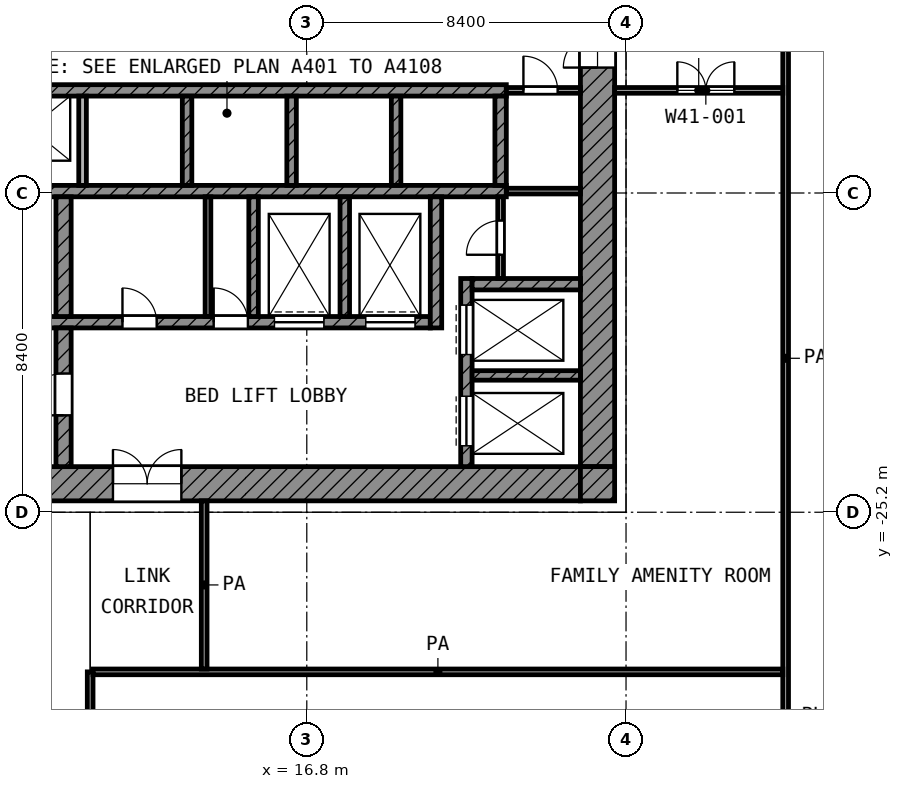
"""IFC4 building model, lengths in metres.
Left out: names, types, materials, properties, quantities, classifications, styles, units other than length and angle.
Written with IfcOpenShell. Run it as: python <this file> out.ifc"""

import sys

from ifc_helpers import new_model, si_unit, direction, frame, frame_2d, origin, place, context, subcontext, project, spatial, rectangle, extrude, element, fill, save


model = new_model("IFC4")
c1 = context("Model", 3, precision=1e-05, world=origin(), true_north=direction((0.0, 1.0)))
c2 = subcontext(c1, "Body", "Model", "MODEL_VIEW")
j1 = project(units=[si_unit("LENGTHUNIT", "METRE"), si_unit("PLANEANGLEUNIT", "RADIAN")], contexts=[c1])
p1 = place(None, origin())
s1 = spatial("IfcSite", under=j1, at=p1, CompositionType="ELEMENT")
p2 = place(p1, origin())
s2 = spatial("IfcBuilding", under=s1, at=p2, CompositionType="ELEMENT")
p3 = place(p2, frame((0.0, 0.0, 200.4)))
s3 = spatial("IfcBuildingStorey", under=s2, at=p3, CompositionType="ELEMENT", Elevation=200.4)
p4 = place(p3, frame((24.45, -24.0, 0.0), z_axis=(0.0, 0.0, 1.0), x_axis=(0.0, 1.0, 0.0)))
e1 = element("IfcWall", 1, at=p4, inside=s3, PredefinedType="SHEAR", context=c2, shape_type="SweptSolid", body=[
    extrude(rectangle(XDim=18.6, YDim=0.9, at=frame_2d((9.3, 0.0))), origin(), (0.0, 0.0, 1.0), 3.6),
])
p5 = place(p4, frame((10.5, 0.0, 0.0)))
e2 = element("IfcOpeningElement", 2, at=p5, cuts=e1, PredefinedType="OPENING", context=c2, shape_type="SweptSolid", body=[
    extrude(rectangle(XDim=1.8, YDim=2.1, at=frame_2d((0.9, 1.05))), frame((0.0, 0.46, 0.0), z_axis=(0.0, -1.0, 0.0), x_axis=(1.0, 0.0, 0.0)), (0.0, 0.0, 1.0), 0.92),
])
p6 = place(p3, frame((5.4, -24.45, 0.0), z_axis=(0.0, 0.0, 1.0), x_axis=(1.0, 0.0, 0.0)))
e3 = element("IfcWall", 3, at=p6, inside=s3, PredefinedType="SHEAR", context=c2, shape_type="SweptSolid", body=[
    extrude(rectangle(XDim=18.6, YDim=0.9, at=frame_2d((9.3, 0.0))), origin(), (0.0, 0.0, 1.0), 3.6),
])
p7 = place(p6, frame((6.3, 0.0, 0.0)))
e4 = element("IfcOpeningElement", 4, at=p7, cuts=e3, PredefinedType="OPENING", context=c2, shape_type="SweptSolid", body=[
    extrude(rectangle(XDim=1.8, YDim=2.1, at=frame_2d((0.9, 1.05))), frame((0.0, 0.46, 0.0), z_axis=(0.0, -1.0, 0.0), x_axis=(1.0, 0.0, 0.0)), (0.0, 0.0, 1.0), 0.92),
])
p8 = place(p3, frame((24.45, -24.9, 0.0), z_axis=(0.0, 0.0, 1.0), x_axis=(0.0, 1.0, 0.0)))
e5 = element("IfcWall", 5, at=p8, inside=s3, PredefinedType="SHEAR", context=c2, shape_type="SweptSolid", body=[
    extrude(rectangle(XDim=0.9, YDim=0.9, at=frame_2d((0.45, 0.0))), origin(), (0.0, 0.0, 1.0), 3.6),
])
p9 = place(p3, frame((5.4, -14.1, 0.0), z_axis=(0.0, 0.0, 1.0), x_axis=(1.0, 0.0, 0.0)))
e6 = element("IfcWall", 6, at=p9, inside=s3, PredefinedType="SHEAR", context=c2, shape_type="SweptSolid", body=[
    extrude(rectangle(XDim=16.65, YDim=0.3, at=frame_2d((8.325, 0.0))), origin(), (0.0, 0.0, 1.0), 3.6),
])
p10 = place(p9, frame((0.825, 0.0, 0.0)))
e7 = element("IfcOpeningElement", 7, at=p10, cuts=e6, PredefinedType="OPENING", context=c2, shape_type="SweptSolid", body=[
    extrude(rectangle(XDim=1.1, YDim=2.1, at=frame_2d((0.55, 1.05))), frame((0.0, 0.16, 0.0), z_axis=(0.0, -1.0, 0.0), x_axis=(1.0, 0.0, 0.0)), (0.0, 0.0, 1.0), 0.32),
])
p11 = place(p9, frame((3.575, 0.0, 0.0)))
e8 = element("IfcOpeningElement", 8, at=p11, cuts=e6, PredefinedType="OPENING", context=c2, shape_type="SweptSolid", body=[
    extrude(rectangle(XDim=1.1, YDim=2.1, at=frame_2d((0.55, 1.05))), frame((0.0, 0.16, 0.0), z_axis=(0.0, -1.0, 0.0), x_axis=(1.0, 0.0, 0.0)), (0.0, 0.0, 1.0), 0.32),
])
p12 = place(p3, frame((5.4, -16.75, 0.0), z_axis=(0.0, 0.0, 1.0), x_axis=(1.0, 0.0, 0.0)))
e9 = element("IfcWall", 9, at=p12, inside=s3, PredefinedType="SHEAR", context=c2, shape_type="SweptSolid", body=[
    extrude(rectangle(XDim=16.65, YDim=0.3, at=frame_2d((8.325, 0.0))), origin(), (0.0, 0.0, 1.0), 3.6),
])
p13 = place(p3, frame((5.4, -20.2, 0.0), z_axis=(0.0, 0.0, 1.0), x_axis=(1.0, 0.0, 0.0)))
e10 = element("IfcWall", 10, at=p13, inside=s3, PredefinedType="SHEAR", context=c2, shape_type="SweptSolid", body=[
    extrude(rectangle(XDim=14.65, YDim=0.3, at=frame_2d((7.325, 0.0))), origin(), (0.0, 0.0, 1.0), 3.6),
])
p14 = place(p13, frame((10.55, 0.0, 0.0)))
e11 = element("IfcOpeningElement", 11, at=p14, cuts=e10, PredefinedType="OPENING", context=c2, shape_type="SweptSolid", body=[
    extrude(rectangle(XDim=1.3, YDim=2.1, at=frame_2d((0.65, 1.05))), frame((0.0, 0.16, 0.0), z_axis=(0.0, -1.0, 0.0), x_axis=(1.0, 0.0, 0.0)), (0.0, 0.0, 1.0), 0.32),
])
p15 = place(p13, frame((12.95, 0.0, 0.0)))
e12 = element("IfcOpeningElement", 12, at=p15, cuts=e10, PredefinedType="OPENING", context=c2, shape_type="SweptSolid", body=[
    extrude(rectangle(XDim=1.3, YDim=2.1, at=frame_2d((0.65, 1.05))), frame((0.0, 0.16, 0.0), z_axis=(0.0, -1.0, 0.0), x_axis=(1.0, 0.0, 0.0)), (0.0, 0.0, 1.0), 0.32),
])
p16 = place(p13, frame((0.55, 0.0, 0.0)))
e13 = element("IfcOpeningElement", 13, at=p16, cuts=e10, PredefinedType="OPENING", context=c2, shape_type="SweptSolid", body=[
    extrude(rectangle(XDim=1.3, YDim=2.1, at=frame_2d((0.65, 1.05))), frame((0.0, 0.16, 0.0), z_axis=(0.0, -1.0, 0.0), x_axis=(1.0, 0.0, 0.0)), (0.0, 0.0, 1.0), 0.32),
])
p17 = place(p13, frame((2.95, 0.0, 0.0)))
e14 = element("IfcOpeningElement", 14, at=p17, cuts=e10, PredefinedType="OPENING", context=c2, shape_type="SweptSolid", body=[
    extrude(rectangle(XDim=1.3, YDim=2.1, at=frame_2d((0.65, 1.05))), frame((0.0, 0.16, 0.0), z_axis=(0.0, -1.0, 0.0), x_axis=(1.0, 0.0, 0.0)), (0.0, 0.0, 1.0), 0.32),
])
p18 = place(p13, frame((6.55, 0.0, 0.0)))
e15 = element("IfcOpeningElement", 15, at=p18, cuts=e10, PredefinedType="OPENING", context=c2, shape_type="SweptSolid", body=[
    extrude(rectangle(XDim=0.9, YDim=2.1, at=frame_2d((0.45, 1.05))), frame((0.0, 0.16, 0.0), z_axis=(0.0, -1.0, 0.0), x_axis=(1.0, 0.0, 0.0)), (0.0, 0.0, 1.0), 0.32),
])
p19 = place(p13, frame((8.95, 0.0, 0.0)))
e16 = element("IfcOpeningElement", 16, at=p19, cuts=e10, PredefinedType="OPENING", context=c2, shape_type="SweptSolid", body=[
    extrude(rectangle(XDim=0.9, YDim=2.1, at=frame_2d((0.45, 1.05))), frame((0.0, 0.16, 0.0), z_axis=(0.0, -1.0, 0.0), x_axis=(1.0, 0.0, 0.0)), (0.0, 0.0, 1.0), 0.32),
])
p20 = place(p3, frame((10.4, -24.0, 0.0), z_axis=(0.0, 0.0, 1.0), x_axis=(0.0, 1.0, 0.0)))
e17 = element("IfcWall", 17, at=p20, inside=s3, PredefinedType="SHEAR", context=c2, shape_type="SweptSolid", body=[
    extrude(rectangle(XDim=3.65, YDim=0.4, at=frame_2d((1.825, 0.0))), origin(), (0.0, 0.0, 1.0), 3.6),
])
p21 = place(p20, frame((1.35, 0.0, 0.0)))
e18 = element("IfcOpeningElement", 18, at=p21, cuts=e17, PredefinedType="OPENING", context=c2, shape_type="SweptSolid", body=[
    extrude(rectangle(XDim=1.1, YDim=2.1, at=frame_2d((0.55, 1.05))), frame((0.0, 0.21, 0.0), z_axis=(0.0, -1.0, 0.0), x_axis=(1.0, 0.0, 0.0)), (0.0, 0.0, 1.0), 0.42),
])
p22 = place(p3, frame((10.4, -20.05, 0.0), z_axis=(0.0, 0.0, 1.0), x_axis=(0.0, 1.0, 0.0)))
e19 = element("IfcWall", 19, at=p22, inside=s3, PredefinedType="SHEAR", context=c2, shape_type="SweptSolid", body=[
    extrude(rectangle(XDim=3.15, YDim=0.4, at=frame_2d((1.575, 0.0))), origin(), (0.0, 0.0, 1.0), 3.6),
])
p23 = place(p3, frame((20.2, -20.35, 0.0), z_axis=(0.0, 0.0, 1.0), x_axis=(0.0, 1.0, 0.0)))
e20 = element("IfcWall", 20, at=p23, inside=s3, PredefinedType="SHEAR", context=c2, shape_type="SweptSolid", body=[
    extrude(rectangle(XDim=3.45, YDim=0.3, at=frame_2d((1.725, 0.0))), origin(), (0.0, 0.0, 1.0), 3.6),
])
p24 = place(p3, frame((21.9, -16.6, 0.0), z_axis=(0.0, 0.0, 1.0), x_axis=(0.0, 1.0, 0.0)))
e21 = element("IfcWall", 21, at=p24, inside=s3, PredefinedType="SHEAR", context=c2, shape_type="SweptSolid", body=[
    extrude(rectangle(XDim=2.35, YDim=0.3, at=frame_2d((1.175, 0.0))), origin(), (0.0, 0.0, 1.0), 3.6),
])
p25 = place(p3, frame((21.15, -19.2, 0.0), z_axis=(0.0, 0.0, 1.0), x_axis=(1.0, 0.0, 0.0)))
e22 = element("IfcWall", 22, at=p25, inside=s3, PredefinedType="SHEAR", context=c2, shape_type="SweptSolid", body=[
    extrude(rectangle(XDim=2.85, YDim=0.3, at=frame_2d((1.425, 0.0))), origin(), (0.0, 0.0, 1.0), 3.6),
])
p26 = place(p3, frame((21.0, -24.0, 0.0), z_axis=(0.0, 0.0, 1.0), x_axis=(0.0, 1.0, 0.0)))
e23 = element("IfcWall", 23, at=p26, inside=s3, PredefinedType="SHEAR", context=c2, shape_type="SweptSolid", body=[
    extrude(rectangle(XDim=4.95, YDim=0.3, at=frame_2d((2.475, 0.0))), origin(), (0.0, 0.0, 1.0), 3.6),
])
p27 = place(p26, frame((2.95, 0.0, 0.0)))
e24 = element("IfcOpeningElement", 24, at=p27, cuts=e23, PredefinedType="OPENING", context=c2, shape_type="SweptSolid", body=[
    extrude(rectangle(XDim=1.3, YDim=2.1, at=frame_2d((0.65, 1.05))), frame((0.0, 0.16, 0.0), z_axis=(0.0, -1.0, 0.0), x_axis=(1.0, 0.0, 0.0)), (0.0, 0.0, 1.0), 0.32),
])
p28 = place(p26, frame((0.55, 0.0, 0.0)))
e25 = element("IfcOpeningElement", 25, at=p28, cuts=e23, PredefinedType="OPENING", context=c2, shape_type="SweptSolid", body=[
    extrude(rectangle(XDim=1.3, YDim=2.1, at=frame_2d((0.65, 1.05))), frame((0.0, 0.16, 0.0), z_axis=(0.0, -1.0, 0.0), x_axis=(1.0, 0.0, 0.0)), (0.0, 0.0, 1.0), 0.32),
])
p29 = place(p3, frame((21.15, -21.6, 0.0), z_axis=(0.0, 0.0, 1.0), x_axis=(1.0, 0.0, 0.0)))
e26 = element("IfcWall", 26, at=p29, inside=s3, PredefinedType="SHEAR", context=c2, shape_type="SweptSolid", body=[
    extrude(rectangle(XDim=2.85, YDim=0.25, at=frame_2d((1.425, 0.0))), origin(), (0.0, 0.0, 1.0), 3.6),
])
for number, where, z_axis, x_axis in (
    (27, (15.4, -20.05, 0.0), (0.0, 0.0, 1.0), (0.0, 1.0, 0.0)),
    (28, (17.8, -20.05, 0.0), (0.0, 0.0, 1.0), (0.0, 1.0, 0.0)),
):
    element("IfcWall", number, at=place(p3, frame(where, z_axis=z_axis, x_axis=x_axis)), inside=s3, PredefinedType="SHEAR", context=c2, shape_type="SweptSolid", body=[
        extrude(rectangle(XDim=3.15, YDim=0.25, at=frame_2d((1.575, 0.0))), origin(), (0.0, 0.0, 1.0), 3.6),
    ])
p30 = place(p3, frame((10.9, -16.6, 0.0), z_axis=(0.0, 0.0, 1.0), x_axis=(0.0, 1.0, 0.0)))
e29 = element("IfcWall", 29, at=p30, inside=s3, PredefinedType="PARTITIONING", context=c2, shape_type="SweptSolid", body=[
    extrude(rectangle(XDim=2.35, YDim=0.2, at=frame_2d((1.175, 0.0))), origin(), (0.0, 0.0, 1.0), 3.6),
])
for number, where, z_axis, x_axis in (
    (30, (13.65, -16.6, 0.0), (0.0, 0.0, 1.0), (0.0, 1.0, 0.0)),
    (31, (16.4, -16.6, 0.0), (0.0, 0.0, 1.0), (0.0, 1.0, 0.0)),
    (32, (19.15, -16.6, 0.0), (0.0, 0.0, 1.0), (0.0, 1.0, 0.0)),
):
    element("IfcWall", number, at=place(p3, frame(where, z_axis=z_axis, x_axis=x_axis)), inside=s3, PredefinedType="SHEAR", context=c2, shape_type="SweptSolid", body=[
        extrude(rectangle(XDim=2.35, YDim=0.25, at=frame_2d((1.175, 0.0))), origin(), (0.0, 0.0, 1.0), 3.6),
    ])
p31 = place(p3, frame((21.9, -19.05, 0.0), z_axis=(0.0, 0.0, 1.0), x_axis=(0.0, 1.0, 0.0)))
e33 = element("IfcWall", 33, at=p31, inside=s3, PredefinedType="PARTITIONING", context=c2, shape_type="SweptSolid", body=[
    extrude(rectangle(XDim=2.15, YDim=0.15, at=frame_2d((1.075, 0.0))), origin(), (0.0, 0.0, 1.0), 3.6),
])
p32 = place(p31, frame((0.625, 0.0, 0.0)))
e34 = element("IfcOpeningElement", 34, at=p32, cuts=e33, PredefinedType="OPENING", context=c2, shape_type="SweptSolid", body=[
    extrude(rectangle(XDim=0.9, YDim=2.1, at=frame_2d((0.45, 1.05))), frame((0.0, 0.085, 0.0), z_axis=(0.0, -1.0, 0.0), x_axis=(1.0, 0.0, 0.0)), (0.0, 0.0, 1.0), 0.17),
])
p33 = place(p3, frame((22.05, -16.75, 0.0), z_axis=(0.0, 0.0, 1.0), x_axis=(1.0, 0.0, 0.0)))
e35 = element("IfcWall", 35, at=p33, inside=s3, PredefinedType="PARTITIONING", context=c2, shape_type="SweptSolid", body=[
    extrude(rectangle(XDim=1.95, YDim=0.15, at=frame_2d((0.975, 0.0))), origin(), (0.0, 0.0, 1.0), 3.6),
])
p34 = place(p3, frame((22.05, -14.1, 0.0), z_axis=(0.0, 0.0, 1.0), x_axis=(1.0, 0.0, 0.0)))
e36 = element("IfcWall", 36, at=p34, inside=s3, PredefinedType="PARTITIONING", context=c2, shape_type="SweptSolid", body=[
    extrude(rectangle(XDim=1.95, YDim=0.15, at=frame_2d((0.975, 0.0))), origin(), (0.0, 0.0, 1.0), 3.6),
])
p35 = place(p34, frame((0.45, 0.0, 0.0)))
e37 = element("IfcOpeningElement", 37, at=p35, cuts=e36, PredefinedType="OPENING", context=c2, shape_type="SweptSolid", body=[
    extrude(rectangle(XDim=0.9, YDim=2.1, at=frame_2d((0.45, 1.05))), frame((0.0, 0.085, 0.0), z_axis=(0.0, -1.0, 0.0), x_axis=(1.0, 0.0, 0.0)), (0.0, 0.0, 1.0), 0.17),
])
p36 = place(p3, frame((14.2, -20.05, 0.0), z_axis=(0.0, 0.0, 1.0), x_axis=(0.0, 1.0, 0.0)))
e38 = element("IfcWall", 38, at=p36, inside=s3, PredefinedType="PARTITIONING", context=c2, shape_type="SweptSolid", body=[
    extrude(rectangle(XDim=3.15, YDim=0.15, at=frame_2d((1.575, 0.0))), origin(), (0.0, 0.0, 1.0), 3.6),
])
p37 = place(p3, frame((11.175, -29.4, 0.0), z_axis=(0.0, 0.0, 1.0), x_axis=(1.0, 0.0, 0.0)))
e39 = element("IfcWall", 39, at=p37, inside=s3, PredefinedType="PARTITIONING", context=c2, shape_type="SweptSolid", body=[
    extrude(rectangle(XDim=18.15, YDim=0.15, at=frame_2d((9.075, 0.0))), origin(), (0.0, 0.0, 1.0), 3.6),
])
p38 = place(p3, frame((24.9, -14.1, 0.0), z_axis=(0.0, 0.0, 1.0), x_axis=(1.0, 0.0, 0.0)))
e40 = element("IfcWall", 40, at=p38, inside=s3, PredefinedType="PARTITIONING", context=c2, shape_type="SweptSolid", body=[
    extrude(rectangle(XDim=4.425, YDim=0.15, at=frame_2d((2.212, 0.0))), origin(), (0.0, 0.0, 1.0), 3.6),
])
p39 = place(p38, frame((1.65, 0.0, 0.0)))
e41 = element("IfcOpeningElement", 41, at=p39, cuts=e40, PredefinedType="OPENING", context=c2, shape_type="SweptSolid", body=[
    extrude(rectangle(XDim=1.5, YDim=2.1, at=frame_2d((0.75, 1.05))), frame((0.0, 0.085, 0.0), z_axis=(0.0, -1.0, 0.0), x_axis=(1.0, 0.0, 0.0)), (0.0, 0.0, 1.0), 0.17),
])
p40 = place(p3, frame((11.1, -54.52, 0.0), z_axis=(0.0, 0.0, 1.0), x_axis=(0.0, 1.0, 0.0)))
e42 = element("IfcWall", 42, at=p40, inside=s3, PredefinedType="PARTITIONING", context=c2, shape_type="SweptSolid", body=[
    extrude(rectangle(XDim=25.12, YDim=0.15, at=frame_2d((12.56, 0.0))), origin(), (0.0, 0.0, 1.0), 3.6),
])
p41 = place(p40, frame((22.42, 0.0, 0.0)))
e43 = element("IfcOpeningElement", 43, at=p41, cuts=e42, PredefinedType="OPENING", context=c2, shape_type="SweptSolid", body=[
    extrude(rectangle(XDim=1.2, YDim=2.1, at=frame_2d((0.6, 1.05))), frame((0.0, 0.085, 0.0), z_axis=(0.0, -1.0, 0.0), x_axis=(1.0, 0.0, 0.0)), (0.0, 0.0, 1.0), 0.17),
])
p42 = place(p40, frame((18.62, 0.0, 0.0)))
e44 = element("IfcOpeningElement", 44, at=p42, cuts=e42, PredefinedType="OPENING", context=c2, shape_type="SweptSolid", body=[
    extrude(rectangle(XDim=1.0, YDim=2.1, at=frame_2d((0.5, 1.05))), frame((0.0, 0.085, 0.0), z_axis=(0.0, -1.0, 0.0), x_axis=(1.0, 0.0, 0.0)), (0.0, 0.0, 1.0), 0.17),
])
p43 = place(p40, frame((14.42, 0.0, 0.0)))
e45 = element("IfcOpeningElement", 45, at=p43, cuts=e42, PredefinedType="OPENING", context=c2, shape_type="SweptSolid", body=[
    extrude(rectangle(XDim=1.0, YDim=2.1, at=frame_2d((0.5, 1.05))), frame((0.0, 0.085, 0.0), z_axis=(0.0, -1.0, 0.0), x_axis=(1.0, 0.0, 0.0)), (0.0, 0.0, 1.0), 0.17),
])
p44 = place(p40, frame((9.92, 0.0, 0.0)))
e46 = element("IfcOpeningElement", 46, at=p44, cuts=e42, PredefinedType="OPENING", context=c2, shape_type="SweptSolid", body=[
    extrude(rectangle(XDim=1.0, YDim=2.1, at=frame_2d((0.5, 1.05))), frame((0.0, 0.085, 0.0), z_axis=(0.0, -1.0, 0.0), x_axis=(1.0, 0.0, 0.0)), (0.0, 0.0, 1.0), 0.17),
])
p45 = place(p40, frame((3.37, 0.0, 0.0)))
e47 = element("IfcOpeningElement", 47, at=p45, cuts=e42, PredefinedType="OPENING", context=c2, shape_type="SweptSolid", body=[
    extrude(rectangle(XDim=1.5, YDim=2.1, at=frame_2d((0.75, 1.05))), frame((0.0, 0.085, 0.0), z_axis=(0.0, -1.0, 0.0), x_axis=(1.0, 0.0, 0.0)), (0.0, 0.0, 1.0), 0.17),
])
p46 = place(p3, frame((14.1, -29.325, 0.0), z_axis=(0.0, 0.0, 1.0), x_axis=(0.0, 1.0, 0.0)))
e48 = element("IfcWall", 48, at=p46, inside=s3, PredefinedType="PARTITIONING", context=c2, shape_type="SweptSolid", body=[
    extrude(rectangle(XDim=4.425, YDim=0.15, at=frame_2d((2.212, 0.0))), origin(), (0.0, 0.0, 1.0), 3.6),
])
p47 = place(p3, frame((29.4, -31.198, 0.0), z_axis=(0.0, 0.0, 1.0), x_axis=(0.0, 1.0, 0.0)))
e49 = element("IfcWall", 49, at=p47, inside=s3, PredefinedType="PARTITIONING", context=c2, shape_type="SweptSolid", body=[
    extrude(rectangle(XDim=20.098, YDim=0.15, at=frame_2d((10.049, 0.0))), origin(), (0.0, 0.0, 1.0), 3.6),
])
p48 = place(p27, origin())
e50 = element("IfcDoor", 50, at=p48, inside=s3, OperationType="DOUBLE_DOOR_SLIDING", PredefinedType="DOOR", context=c2, shape_type="SweptSolid", body=[
    extrude(rectangle(XDim=1.3, YDim=2.1, at=frame_2d((0.65, 1.05))), frame((0.0, 0.025, 0.0), z_axis=(0.0, -1.0, 0.0), x_axis=(1.0, 0.0, 0.0)), (0.0, 0.0, 1.0), 0.05),
])
fill(e24, e50)
p49 = place(p28, origin())
e51 = element("IfcDoor", 51, at=p49, inside=s3, OperationType="DOUBLE_DOOR_SLIDING", PredefinedType="DOOR", context=c2, shape_type="SweptSolid", body=[
    extrude(rectangle(XDim=1.3, YDim=2.1, at=frame_2d((0.65, 1.05))), frame((0.0, 0.025, 0.0), z_axis=(0.0, -1.0, 0.0), x_axis=(1.0, 0.0, 0.0)), (0.0, 0.0, 1.0), 0.05),
])
fill(e25, e51)
p50 = place(p14, origin())
e52 = element("IfcDoor", 52, at=p50, inside=s3, OperationType="DOUBLE_DOOR_SLIDING", PredefinedType="DOOR", context=c2, shape_type="SweptSolid", body=[
    extrude(rectangle(XDim=1.3, YDim=2.1, at=frame_2d((0.65, 1.05))), frame((0.0, 0.025, 0.0), z_axis=(0.0, -1.0, 0.0), x_axis=(1.0, 0.0, 0.0)), (0.0, 0.0, 1.0), 0.05),
])
fill(e11, e52)
p51 = place(p15, origin())
e53 = element("IfcDoor", 53, at=p51, inside=s3, OperationType="DOUBLE_DOOR_SLIDING", PredefinedType="DOOR", context=c2, shape_type="SweptSolid", body=[
    extrude(rectangle(XDim=1.3, YDim=2.1, at=frame_2d((0.65, 1.05))), frame((0.0, 0.025, 0.0), z_axis=(0.0, -1.0, 0.0), x_axis=(1.0, 0.0, 0.0)), (0.0, 0.0, 1.0), 0.05),
])
fill(e12, e53)
p52 = place(p21, origin())
e54 = element("IfcDoor", 54, at=p52, inside=s3, OperationType="SINGLE_SWING_LEFT", PredefinedType="DOOR", context=c2, shape_type="SweptSolid", body=[
    extrude(rectangle(XDim=1.1, YDim=2.1, at=frame_2d((0.55, 1.05))), frame((0.0, 0.025, 0.0), z_axis=(0.0, -1.0, 0.0), x_axis=(1.0, 0.0, 0.0)), (0.0, 0.0, 1.0), 0.05),
])
fill(e18, e54)
p53 = place(p5, origin())
e55 = element("IfcDoor", 55, at=p53, inside=s3, OperationType="DOUBLE_DOOR_SINGLE_SWING", PredefinedType="DOOR", context=c2, shape_type="SweptSolid", body=[
    extrude(rectangle(XDim=1.8, YDim=2.1, at=frame_2d((0.9, 1.05))), frame((0.0, 0.025, 0.0), z_axis=(0.0, -1.0, 0.0), x_axis=(1.0, 0.0, 0.0)), (0.0, 0.0, 1.0), 0.05),
])
fill(e2, e55)
p54 = place(p7, origin())
e56 = element("IfcDoor", 56, at=p54, inside=s3, OperationType="DOUBLE_DOOR_SINGLE_SWING", PredefinedType="DOOR", context=c2, shape_type="SweptSolid", body=[
    extrude(rectangle(XDim=1.8, YDim=2.1, at=frame_2d((0.9, 1.05))), frame((0.0, 0.025, 0.0), z_axis=(0.0, -1.0, 0.0), x_axis=(1.0, 0.0, 0.0)), (0.0, 0.0, 1.0), 0.05),
])
fill(e4, e56)
p55 = place(p35, origin())
e57 = element("IfcDoor", 57, at=p55, inside=s3, OperationType="SINGLE_SWING_LEFT", PredefinedType="DOOR", context=c2, shape_type="SweptSolid", body=[
    extrude(rectangle(XDim=0.9, YDim=2.1, at=frame_2d((0.45, 1.05))), frame((0.0, 0.025, 0.0), z_axis=(0.0, -1.0, 0.0), x_axis=(1.0, 0.0, 0.0)), (0.0, 0.0, 1.0), 0.05),
])
fill(e37, e57)
p56 = place(p32, origin())
e58 = element("IfcDoor", 58, at=p56, inside=s3, OperationType="SINGLE_SWING_LEFT", PredefinedType="DOOR", context=c2, shape_type="SweptSolid", body=[
    extrude(rectangle(XDim=0.9, YDim=2.1, at=frame_2d((0.45, 1.05))), frame((0.0, 0.025, 0.0), z_axis=(0.0, -1.0, 0.0), x_axis=(1.0, 0.0, 0.0)), (0.0, 0.0, 1.0), 0.05),
])
fill(e34, e58)
p57 = place(p18, origin())
e59 = element("IfcDoor", 59, at=p57, inside=s3, OperationType="SINGLE_SWING_LEFT", PredefinedType="DOOR", context=c2, shape_type="SweptSolid", body=[
    extrude(rectangle(XDim=0.9, YDim=2.1, at=frame_2d((0.45, 1.05))), frame((0.0, 0.025, 0.0), z_axis=(0.0, -1.0, 0.0), x_axis=(1.0, 0.0, 0.0)), (0.0, 0.0, 1.0), 0.05),
])
fill(e15, e59)
p58 = place(p19, origin())
e60 = element("IfcDoor", 60, at=p58, inside=s3, OperationType="SINGLE_SWING_LEFT", PredefinedType="DOOR", context=c2, shape_type="SweptSolid", body=[
    extrude(rectangle(XDim=0.9, YDim=2.1, at=frame_2d((0.45, 1.05))), frame((0.0, 0.025, 0.0), z_axis=(0.0, -1.0, 0.0), x_axis=(1.0, 0.0, 0.0)), (0.0, 0.0, 1.0), 0.05),
])
fill(e16, e60)
p59 = place(p39, origin())
e61 = element("IfcDoor", 61, at=p59, inside=s3, OperationType="DOUBLE_DOOR_SINGLE_SWING", PredefinedType="DOOR", context=c2, shape_type="SweptSolid", body=[
    extrude(rectangle(XDim=1.5, YDim=2.1, at=frame_2d((0.75, 1.05))), frame((0.0, 0.025, 0.0), z_axis=(0.0, -1.0, 0.0), x_axis=(1.0, 0.0, 0.0)), (0.0, 0.0, 1.0), 0.05),
])
fill(e41, e61)
save(model, sys.argv[1])
